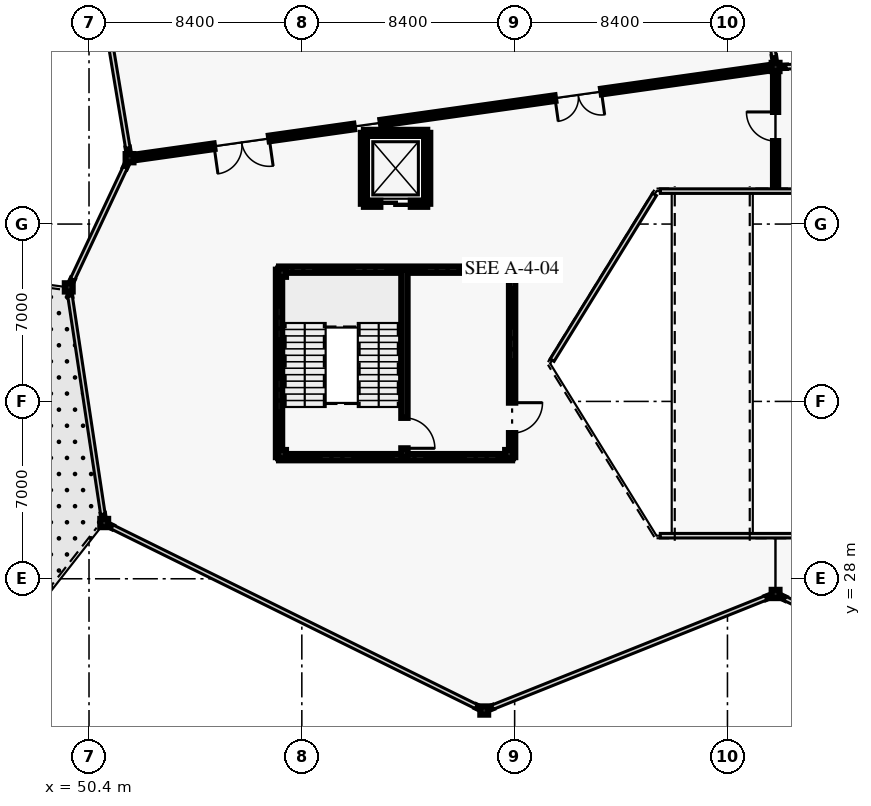
"""IFC4 building model, lengths in metres.
Left out: names, types, materials, properties, quantities, classifications, styles, units other than length and angle.
Written with IfcOpenShell. Run it as: python <this file> out.ifc"""

import sys

from ifc_helpers import new_model, si_unit, direction, frame, frame_2d, origin, origin_2d, place, context, subcontext, project, spatial, rectangle, i_section, extrude, element, fill, save


model = new_model("IFC4")
c1 = context("Model", 3, precision=1e-05, world=origin(), true_north=direction((0.0, 1.0)))
c2 = subcontext(c1, "Body", "Model", "MODEL_VIEW")
j1 = project(units=[si_unit("LENGTHUNIT", "METRE"), si_unit("PLANEANGLEUNIT", "RADIAN")], contexts=[c1])
p1 = place(None, origin())
s1 = spatial("IfcSite", under=j1, at=p1, CompositionType="ELEMENT")
p2 = place(p1, origin())
s2 = spatial("IfcBuilding", under=s1, at=p2, CompositionType="ELEMENT")
p3 = place(p2, frame((0.0, 0.0, 10.2)))
s3 = spatial("IfcBuildingStorey", under=s2, at=p3, CompositionType="ELEMENT", Elevation=10.2)
for number, where, z_axis, x_axis in (
    (1, (49.6, 39.5, 0.0), (0.0, 0.0, 1.0), (1.0, 0.0, 0.0)),
    (2, (51.0, 30.2, 0.0), (0.0, 0.0, 1.0), (1.0, 0.0, 0.0)),
    (3, (52.0, 44.6, 0.0), (0.0, 0.0, 1.0), (1.0, 0.0, 0.0)),
    (4, (66.0, 22.8, 0.0), (0.0, 0.0, 1.0), (1.0, 0.0, 0.0)),
    (5, (77.5, 27.4, 0.0), (0.0, 0.0, 1.0), (1.0, 0.0, 0.0)),
    (6, (77.5, 48.2, 0.0), (0.0, 0.0, 1.0), (1.0, 0.0, 0.0)),
    (7, (58.02, 32.92, 0.0), (0.0, 0.0, 1.0), (1.0, 0.0, 0.0)),
    (8, (66.98, 32.92, 0.0), (0.0, 0.0, 1.0), (1.0, 0.0, 0.0)),
    (9, (66.98, 40.08, 0.0), (0.0, 0.0, 1.0), (1.0, 0.0, 0.0)),
    (10, (58.02, 40.08, 0.0), (0.0, 0.0, 1.0), (1.0, 0.0, 0.0)),
):
    element("IfcColumn", number, at=place(p3, frame(where, z_axis=z_axis, x_axis=x_axis)), inside=s3, PredefinedType="COLUMN", context=c2, shape_type="SweptSolid", body=[
        extrude(i_section(OverallWidth=0.311, OverallDepth=0.327, WebThickness=0.016, FlangeThickness=0.025, FilletRadius=0.017, at=origin_2d()), origin(), (0.0, 0.0, 1.0), 4.8),
    ])
for number, where, z_axis, x_axis in (
    (11, (50.994, 30.242, 0.0), (0.0, 0.0, 1.0), (-0.149, 0.989, 0.0)),
    (12, (49.652, 39.154, 0.0), (0.0, 0.0, 1.0), (-0.15, 0.989, 0.0)),
):
    element("IfcWall", number, at=place(p3, frame(where, z_axis=z_axis, x_axis=x_axis)), inside=s3, PredefinedType="SOLIDWALL", context=c2, shape_type="SweptSolid", body=[
        extrude(rectangle(XDim=0.307, YDim=0.095, at=frame_2d((0.154, 0.0))), origin(), (0.0, 0.0, 1.0), 3.62),
    ])
for number, where, z_axis, x_axis in (
    (13, (65.962, 22.819, 0.0), (0.0, 0.0, 1.0), (-0.897, 0.442, 0.0)),
    (14, (51.314, 30.045, 0.0), (0.0, 0.0, 1.0), (-0.897, 0.442, 0.0)),
):
    element("IfcWall", number, at=place(p3, frame(where, z_axis=z_axis, x_axis=x_axis)), inside=s3, PredefinedType="SOLIDWALL", context=c2, shape_type="SweptSolid", body=[
        extrude(rectangle(XDim=0.308, YDim=0.095, at=frame_2d((0.154, 0.0))), origin(), (0.0, 0.0, 1.0), 3.62),
    ])
p4 = place(p3, frame((77.405, 27.362, 0.0), z_axis=(0.0, 0.0, 1.0), x_axis=(-0.928967856381, -0.370160400111, 0.0)))
e15 = element("IfcWall", 15, at=p4, inside=s3, PredefinedType="SOLIDWALL", context=c2, shape_type="SweptSolid", body=[
    extrude(rectangle(XDim=0.308, YDim=0.095, at=frame_2d((0.154, 0.0))), origin(), (0.0, 0.0, 1.0), 3.62),
])
p5 = place(p3, frame((66.325, 22.93, 0.0), z_axis=(0.0, 0.0, 1.0), x_axis=(-0.928859130521, -0.370433145989, 0.0)))
e16 = element("IfcWall", 16, at=p5, inside=s3, PredefinedType="SOLIDWALL", context=c2, shape_type="SweptSolid", body=[
    extrude(rectangle(XDim=0.308, YDim=0.095, at=frame_2d((0.154, 0.0))), origin(), (0.0, 0.0, 1.0), 3.62),
])
p6 = place(p3, frame((49.618, 39.538, 0.0), z_axis=(0.0, 0.0, 1.0), x_axis=(0.425529884469, 0.904944372558, 0.0)))
e17 = element("IfcWall", 17, at=p6, inside=s3, PredefinedType="SOLIDWALL", context=c2, shape_type="SweptSolid", body=[
    extrude(rectangle(XDim=0.308, YDim=0.095, at=frame_2d((0.154, 0.0))), origin(), (0.0, 0.0, 1.0), 3.62),
])
for number, where, z_axis, x_axis in (
    (18, (51.825, 44.229, 0.0), (0.0, 0.0, 1.0), (0.425, 0.905, 0.0)),
    (19, (77.87, 27.223, 0.0), (0.0, 0.0, 1.0), (-0.902, 0.432, 0.0)),
):
    element("IfcWall", number, at=place(p3, frame(where, z_axis=z_axis, x_axis=x_axis)), inside=s3, PredefinedType="SOLIDWALL", context=c2, shape_type="SweptSolid", body=[
        extrude(rectangle(XDim=0.308, YDim=0.095, at=frame_2d((0.154, 0.0))), origin(), (0.0, 0.0, 1.0), 3.62),
    ])
p7 = place(p3, frame((77.602, 48.202, 0.0), z_axis=(0.0, 0.0, 1.0), x_axis=(0.999735659566, 0.022991541735, 0.0)))
e20 = element("IfcWall", 20, at=p7, inside=s3, PredefinedType="SOLIDWALL", context=c2, shape_type="SweptSolid", body=[
    extrude(rectangle(XDim=0.308, YDim=0.095, at=frame_2d((0.154, 0.0))), origin(), (0.0, 0.0, 1.0), 3.62),
])
p8 = place(p3, frame((51.983, 44.7, 0.0), z_axis=(0.0, 0.0, 1.0), x_axis=(-0.165554954509, 0.986200566334, 0.0)))
e21 = element("IfcWall", 21, at=p8, inside=s3, PredefinedType="SOLIDWALL", context=c2, shape_type="SweptSolid", body=[
    extrude(rectangle(XDim=0.308, YDim=0.095, at=frame_2d((0.154, 0.0))), origin(), (0.0, 0.0, 1.0), 3.62),
])
p9 = place(p3, frame((77.439, 48.605, 0.0), z_axis=(0.0, 0.0, 1.0), x_axis=(0.15008766182, -0.988672692942, 0.0)))
e22 = element("IfcWall", 22, at=p9, inside=s3, PredefinedType="SOLIDWALL", context=c2, shape_type="SweptSolid", body=[
    extrude(rectangle(XDim=0.307, YDim=0.095, at=frame_2d((0.154, 0.0))), origin(), (0.0, 0.0, 1.0), 3.62),
])
p10 = place(p3, frame((77.5, 43.5, 0.0), z_axis=(0.0, 0.0, 1.0), x_axis=(0.0, 1.0, 0.0)))
e23 = element("IfcWall", 23, at=p10, inside=s3, PredefinedType="SOLIDWALL", context=c2, shape_type="SweptSolid", body=[
    extrude(rectangle(XDim=4.7, YDim=0.205, at=frame_2d((2.35, 0.0))), origin(), (0.0, 0.0, 1.0), 3.32),
])
p11 = place(p10, frame((1.775, 0.0, 0.0)))
e24 = element("IfcOpeningElement", 24, at=p11, cuts=e23, PredefinedType="OPENING", context=c2, shape_type="SweptSolid", body=[
    extrude(rectangle(XDim=1.15, YDim=2.2, at=frame_2d((0.575, 1.1))), frame((0.0, 0.113, 0.0), z_axis=(0.0, -1.0, 0.0), x_axis=(1.0, 0.0, 0.0)), (0.0, 0.0, 1.0), 0.225),
])
p12 = place(p3, frame((77.5, 48.2, 0.0), z_axis=(0.0, 0.0, 1.0), x_axis=(-0.990181159322, -0.139790098807, 0.0)))
e25 = element("IfcWall", 25, at=p12, inside=s3, PredefinedType="SOLIDWALL", context=c2, shape_type="SweptSolid", body=[
    extrude(rectangle(XDim=15.738, YDim=0.225, at=frame_2d((7.869, 0.0))), origin(), (0.0, 0.0, 1.0), 4.02),
])
p13 = place(p12, frame((6.944, 0.0, 0.0)))
e26 = element("IfcOpeningElement", 26, at=p13, cuts=e25, PredefinedType="OPENING", context=c2, shape_type="SweptSolid", body=[
    extrude(rectangle(XDim=1.85, YDim=2.4, at=frame_2d((0.925, 1.2))), frame((0.0, 0.123, 0.0), z_axis=(0.0, -1.0, 0.0), x_axis=(1.0, 0.0, 0.0)), (0.0, 0.0, 1.0), 0.245),
])
p14 = place(p3, frame((60.85, 45.849, 0.0), z_axis=(0.0, 0.0, 1.0), x_axis=(-0.990187360524, -0.139746166523, 0.0)))
e27 = element("IfcWall", 27, at=p14, inside=s3, PredefinedType="SOLIDWALL", context=c2, shape_type="SweptSolid", body=[
    extrude(rectangle(XDim=8.938, YDim=0.225, at=frame_2d((4.469, 0.0))), origin(), (0.0, 0.0, 1.0), 4.02),
])
p15 = place(p14, frame((3.369, 0.0, 0.0)))
e28 = element("IfcOpeningElement", 28, at=p15, cuts=e27, PredefinedType="OPENING", context=c2, shape_type="SweptSolid", body=[
    extrude(rectangle(XDim=2.2, YDim=2.6, at=frame_2d((1.1, 1.3))), frame((0.0, 0.123, 0.0), z_axis=(0.0, -1.0, 0.0), x_axis=(1.0, 0.0, 0.0)), (0.0, 0.0, 1.0), 0.245),
])
p16 = place(p3, frame((57.9, 32.8, 0.0), z_axis=(0.0, 0.0, 1.0), x_axis=(0.0, 1.0, 0.0)))
e29 = element("IfcWall", 29, at=p16, inside=s3, PredefinedType="SHEAR", context=c2, shape_type="SweptSolid", body=[
    extrude(rectangle(XDim=7.4, YDim=0.25, at=frame_2d((3.7, 0.0))), origin(), (0.0, 0.0, 1.0), 4.56),
])
for number, where, z_axis, x_axis in (
    (30, (57.9, 40.2, 0.0), (0.0, 0.0, 1.0), (1.0, 0.0, 0.0)),
    (31, (67.1, 32.8, 0.0), (0.0, 0.0, 1.0), (-1.0, 0.0, 0.0)),
):
    element("IfcWall", number, at=place(p3, frame(where, z_axis=z_axis, x_axis=x_axis)), inside=s3, PredefinedType="SHEAR", context=c2, shape_type="SweptSolid", body=[
        extrude(rectangle(XDim=9.2, YDim=0.25, at=frame_2d((4.6, 0.0))), origin(), (0.0, 0.0, 1.0), 4.56),
    ])
p17 = place(p3, frame((67.1, 40.2, 0.0), z_axis=(0.0, 0.0, 1.0), x_axis=(0.0, -1.0, 0.0)))
e32 = element("IfcWall", 32, at=p17, inside=s3, PredefinedType="SHEAR", context=c2, shape_type="SweptSolid", body=[
    extrude(rectangle(XDim=7.4, YDim=0.25, at=frame_2d((3.7, 0.0))), origin(), (0.0, 0.0, 1.0), 4.56),
])
p18 = place(p17, frame((5.25, 0.0, 0.0)))
e33 = element("IfcOpeningElement", 33, at=p18, cuts=e32, PredefinedType="OPENING", context=c2, shape_type="SweptSolid", body=[
    extrude(rectangle(XDim=1.2, YDim=2.2, at=frame_2d((0.6, 1.1))), frame((0.0, 0.135, 0.0), z_axis=(0.0, -1.0, 0.0), x_axis=(1.0, 0.0, 0.0)), (0.0, 0.0, 1.0), 0.27),
])
p19 = place(p3, frame((62.85, 40.2, 0.0), z_axis=(0.0, 0.0, 1.0), x_axis=(0.0, -1.0, 0.0)))
e34 = element("IfcWall", 34, at=p19, inside=s3, PredefinedType="SHEAR", context=c2, shape_type="SweptSolid", body=[
    extrude(rectangle(XDim=7.4, YDim=0.25, at=frame_2d((3.7, 0.0))), origin(), (0.0, 0.0, 1.0), 4.56),
])
p20 = place(p19, frame((5.85, 0.0, 0.0)))
e35 = element("IfcOpeningElement", 35, at=p20, cuts=e34, PredefinedType="OPENING", context=c2, shape_type="SweptSolid", body=[
    extrude(rectangle(XDim=1.2, YDim=2.2, at=frame_2d((0.6, 1.1))), frame((0.0, 0.135, 0.0), z_axis=(0.0, -1.0, 0.0), x_axis=(1.0, 0.0, 0.0)), (0.0, 0.0, 1.0), 0.27),
])
p21 = place(p3, frame((61.25, 45.6, 0.0), z_axis=(0.0, 0.0, 1.0), x_axis=(1.0, 0.0, 0.0)))
e36 = element("IfcWall", 36, at=p21, inside=s3, PredefinedType="SHEAR", context=c2, shape_type="SweptSolid", body=[
    extrude(rectangle(XDim=2.5, YDim=0.24, at=frame_2d((1.25, 0.0))), origin(), (0.0, 0.0, 1.0), 4.56),
])
for number, where, z_axis, x_axis in (
    (37, (63.75, 45.6, 0.0), (0.0, 0.0, 1.0), (0.0, -1.0, 0.0)),
    (38, (61.25, 42.8, 0.0), (0.0, 0.0, 1.0), (0.0, 1.0, 0.0)),
):
    element("IfcWall", number, at=place(p3, frame(where, z_axis=z_axis, x_axis=x_axis)), inside=s3, PredefinedType="SHEAR", context=c2, shape_type="SweptSolid", body=[
        extrude(rectangle(XDim=2.8, YDim=0.24, at=frame_2d((1.4, 0.0))), origin(), (0.0, 0.0, 1.0), 4.56),
    ])
p22 = place(p3, frame((63.75, 42.8, 0.0), z_axis=(0.0, 0.0, 1.0), x_axis=(-1.0, 0.0, 0.0)))
e39 = element("IfcWall", 39, at=p22, inside=s3, PredefinedType="SHEAR", context=c2, shape_type="SweptSolid", body=[
    extrude(rectangle(XDim=2.5, YDim=0.24, at=frame_2d((1.25, 0.0))), origin(), (0.0, 0.0, 1.0), 4.56),
])
p23 = place(p22, frame((0.65, 0.0, 0.0)))
e40 = element("IfcOpeningElement", 40, at=p23, cuts=e39, PredefinedType="OPENING", context=c2, shape_type="SweptSolid", body=[
    extrude(rectangle(XDim=1.2, YDim=2.2, at=frame_2d((0.6, 1.1))), frame((0.0, 0.13, 0.0), z_axis=(0.0, -1.0, 0.0), x_axis=(1.0, 0.0, 0.0)), (0.0, 0.0, 1.0), 0.26),
])
p24 = place(p11, origin())
e41 = element("IfcDoor", 41, at=p24, inside=s3, OperationType="SINGLE_SWING_RIGHT", PredefinedType="DOOR", context=c2, shape_type="SweptSolid", body=[
    extrude(rectangle(XDim=1.15, YDim=2.2, at=frame_2d((0.575, 1.1))), frame((0.0, 0.025, 0.0), z_axis=(0.0, -1.0, 0.0), x_axis=(1.0, 0.0, 0.0)), (0.0, 0.0, 1.0), 0.05),
])
fill(e24, e41)
p25 = place(p13, origin())
e42 = element("IfcDoor", 42, at=p25, inside=s3, OperationType="DOUBLE_DOOR_SINGLE_SWING", PredefinedType="DOOR", context=c2, shape_type="SweptSolid", body=[
    extrude(rectangle(XDim=1.85, YDim=2.4, at=frame_2d((0.925, 1.2))), frame((0.0, 0.025, 0.0), z_axis=(0.0, -1.0, 0.0), x_axis=(1.0, 0.0, 0.0)), (0.0, 0.0, 1.0), 0.05),
])
fill(e26, e42)
p26 = place(p15, origin())
e43 = element("IfcDoor", 43, at=p26, inside=s3, OperationType="DOUBLE_DOOR_SINGLE_SWING", PredefinedType="DOOR", context=c2, shape_type="SweptSolid", body=[
    extrude(rectangle(XDim=2.2, YDim=2.6, at=frame_2d((1.1, 1.3))), frame((0.0, 0.025, 0.0), z_axis=(0.0, -1.0, 0.0), x_axis=(1.0, 0.0, 0.0)), (0.0, 0.0, 1.0), 0.05),
])
fill(e28, e43)
p27 = place(p18, origin())
e44 = element("IfcDoor", 44, at=p27, inside=s3, OperationType="SINGLE_SWING_LEFT", PredefinedType="DOOR", context=c2, shape_type="SweptSolid", body=[
    extrude(rectangle(XDim=1.2, YDim=2.2, at=frame_2d((0.6, 1.1))), frame((0.0, 0.025, 0.0), z_axis=(0.0, -1.0, 0.0), x_axis=(1.0, 0.0, 0.0)), (0.0, 0.0, 1.0), 0.05),
])
fill(e33, e44)
p28 = place(p20, origin())
e45 = element("IfcDoor", 45, at=p28, inside=s3, OperationType="SINGLE_SWING_RIGHT", PredefinedType="DOOR", context=c2, shape_type="SweptSolid", body=[
    extrude(rectangle(XDim=1.2, YDim=2.2, at=frame_2d((0.6, 1.1))), frame((0.0, 0.025, 0.0), z_axis=(0.0, -1.0, 0.0), x_axis=(1.0, 0.0, 0.0)), (0.0, 0.0, 1.0), 0.05),
])
fill(e35, e45)
p29 = place(p23, origin())
e46 = element("IfcDoor", 46, at=p29, inside=s3, OperationType="SLIDING_TO_LEFT", PredefinedType="DOOR", context=c2, shape_type="SweptSolid", body=[
    extrude(rectangle(XDim=1.2, YDim=2.2, at=frame_2d((0.6, 1.1))), frame((0.0, 0.025, 0.0), z_axis=(0.0, -1.0, 0.0), x_axis=(1.0, 0.0, 0.0)), (0.0, 0.0, 1.0), 0.05),
])
fill(e40, e46)
save(model, sys.argv[1])
